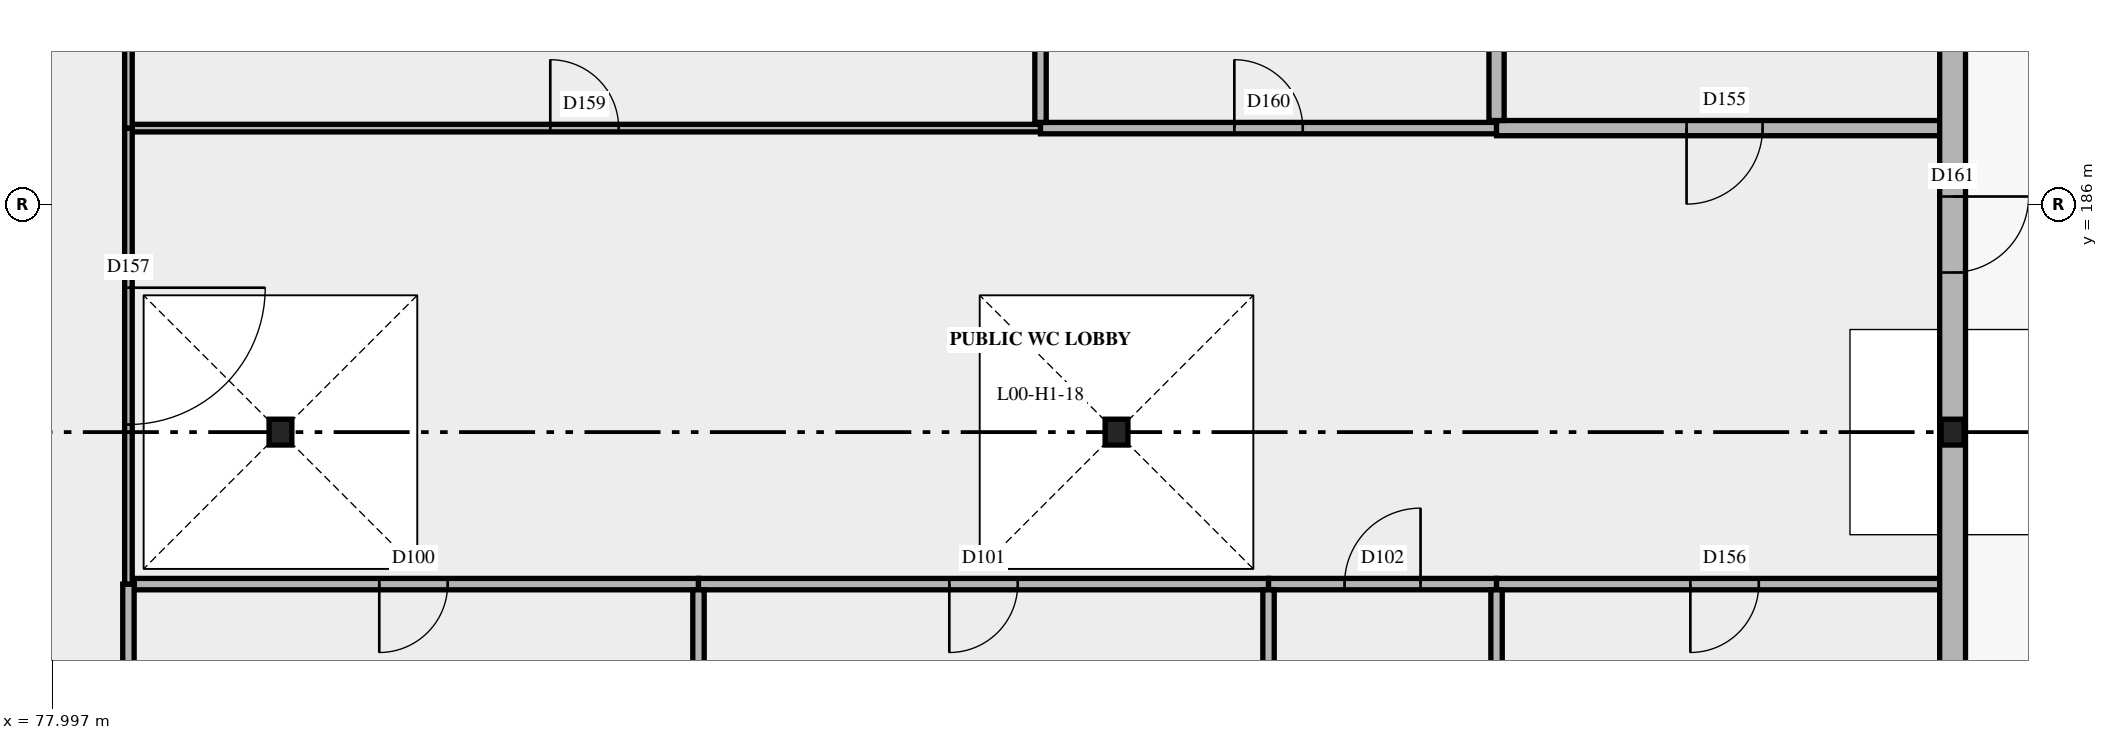
"""IFC4 building model, lengths in metres.
Left out: names, types, materials, properties, quantities, classifications, styles, units other than length and angle.
Written with IfcOpenShell. Run it as: python <this file> out.ifc"""

import sys

from ifc_helpers import new_model, si_unit, direction, frame, frame_2d, origin, origin_2d, place, context, subcontext, project, spatial, rectangle, i_section, extrude, element, fill, save


model = new_model("IFC4")
c1 = context("Model", 3, precision=1e-05, world=origin(), true_north=direction((0.0, 1.0)))
c2 = subcontext(c1, "Body", "Model", "MODEL_VIEW")
j1 = project(units=[si_unit("LENGTHUNIT", "METRE"), si_unit("PLANEANGLEUNIT", "RADIAN")], contexts=[c1])
p1 = place(None, origin())
s1 = spatial("IfcSite", under=j1, at=p1, CompositionType="ELEMENT")
p2 = place(p1, origin())
s2 = spatial("IfcBuilding", under=s1, at=p2, CompositionType="ELEMENT")
p3 = place(p2, origin())
s3 = spatial("IfcBuildingStorey", under=s2, at=p3, CompositionType="ELEMENT", Elevation=0.0)
for number, where, z_axis, x_axis in (
    (1, (81.0, 183.0, 0.0), (0.0, 0.0, 1.0), (1.0, 0.0, 0.0)),
    (2, (92.0, 183.0, 0.0), (0.0, 0.0, 1.0), (1.0, 0.0, 0.0)),
    (3, (103.0, 183.0, 0.0), (0.0, 0.0, 1.0), (1.0, 0.0, 0.0)),
):
    element("IfcColumn", number, at=place(p3, frame(where, z_axis=z_axis, x_axis=x_axis)), inside=s3, PredefinedType="COLUMN", context=c2, shape_type="SweptSolid", body=[
        extrude(i_section(OverallWidth=0.3, OverallDepth=0.34, WebThickness=0.012, FlangeThickness=0.021, at=origin_2d()), origin(), (0.0, 0.0, 1.0), 4.65),
    ])
p4 = place(p3, frame((79.075, 181.0, 0.0), z_axis=(0.0, 0.0, 1.0), x_axis=(1.0, 0.0, 0.0)))
e4 = element("IfcWall", 4, at=p4, inside=s3, PredefinedType="PARTITIONING", context=c2, shape_type="SweptSolid", body=[
    extrude(rectangle(XDim=7.425, YDim=0.15, at=frame_2d((3.712, 0.0))), origin(), (0.0, 0.0, 1.0), 5.15),
])
p5 = place(p4, frame((3.225, 0.0, 0.0)))
e5 = element("IfcOpeningElement", 5, at=p5, cuts=e4, PredefinedType="OPENING", context=c2, shape_type="SweptSolid", body=[
    extrude(rectangle(XDim=0.9, YDim=2.1, at=frame_2d((0.45, 1.05))), frame((0.0, 0.085, 0.0), z_axis=(0.0, -1.0, 0.0), x_axis=(1.0, 0.0, 0.0)), (0.0, 0.0, 1.0), 0.17),
])
p6 = place(p3, frame((86.5, 181.0, 0.0), z_axis=(0.0, 0.0, 1.0), x_axis=(1.0, 0.0, 0.0)))
e6 = element("IfcWall", 6, at=p6, inside=s3, PredefinedType="PARTITIONING", context=c2, shape_type="SweptSolid", body=[
    extrude(rectangle(XDim=7.5, YDim=0.15, at=frame_2d((3.75, 0.0))), origin(), (0.0, 0.0, 1.0), 5.15),
])
p7 = place(p6, frame((3.3, 0.0, 0.0)))
e7 = element("IfcOpeningElement", 7, at=p7, cuts=e6, PredefinedType="OPENING", context=c2, shape_type="SweptSolid", body=[
    extrude(rectangle(XDim=0.9, YDim=2.1, at=frame_2d((0.45, 1.05))), frame((0.0, 0.085, 0.0), z_axis=(0.0, -1.0, 0.0), x_axis=(1.0, 0.0, 0.0)), (0.0, 0.0, 1.0), 0.17),
])
p8 = place(p3, frame((94.0, 181.0, 0.0), z_axis=(0.0, 0.0, 1.0), x_axis=(1.0, 0.0, 0.0)))
e8 = element("IfcWall", 8, at=p8, inside=s3, PredefinedType="PARTITIONING", context=c2, shape_type="SweptSolid", body=[
    extrude(rectangle(XDim=3.0, YDim=0.15, at=frame_2d((1.5, 0.0))), origin(), (0.0, 0.0, 1.0), 5.15),
])
p9 = place(p8, frame((1.0, 0.0, 0.0)))
e9 = element("IfcOpeningElement", 9, at=p9, cuts=e8, PredefinedType="OPENING", context=c2, shape_type="SweptSolid", body=[
    extrude(rectangle(XDim=1.0, YDim=2.1, at=frame_2d((0.5, 1.05))), frame((0.0, 0.085, 0.0), z_axis=(0.0, -1.0, 0.0), x_axis=(1.0, 0.0, 0.0)), (0.0, 0.0, 1.0), 0.17),
])
p10 = place(p3, frame((97.0, 181.0, 0.0), z_axis=(0.0, 0.0, 1.0), x_axis=(1.0, 0.0, 0.0)))
e10 = element("IfcWall", 10, at=p10, inside=s3, PredefinedType="PARTITIONING", context=c2, shape_type="SweptSolid", body=[
    extrude(rectangle(XDim=6.0, YDim=0.15, at=frame_2d((3.0, 0.0))), origin(), (0.0, 0.0, 1.0), 5.15),
])
p11 = place(p10, frame((2.55, 0.0, 0.0)))
e11 = element("IfcOpeningElement", 11, at=p11, cuts=e10, PredefinedType="OPENING", context=c2, shape_type="SweptSolid", body=[
    extrude(rectangle(XDim=0.9, YDim=2.1, at=frame_2d((0.45, 1.05))), frame((0.0, 0.085, 0.0), z_axis=(0.0, -1.0, 0.0), x_axis=(1.0, 0.0, 0.0)), (0.0, 0.0, 1.0), 0.17),
])
p12 = place(p3, frame((79.05, 187.0, 0.0), z_axis=(0.0, 0.0, 1.0), x_axis=(1.0, 0.0, 0.0)))
e12 = element("IfcWall", 12, at=p12, inside=s3, PredefinedType="PARTITIONING", context=c2, shape_type="SweptSolid", body=[
    extrude(rectangle(XDim=11.95, YDim=0.1, at=frame_2d((5.975, 0.0))), origin(), (0.0, 0.0, 1.0), 5.15),
])
p13 = place(p12, frame((5.5, 0.0, 0.0)))
e13 = element("IfcOpeningElement", 13, at=p13, cuts=e12, PredefinedType="OPENING", context=c2, shape_type="SweptSolid", body=[
    extrude(rectangle(XDim=0.9, YDim=2.1, at=frame_2d((0.45, 1.05))), frame((0.0, 0.06, 0.0), z_axis=(0.0, -1.0, 0.0), x_axis=(1.0, 0.0, 0.0)), (0.0, 0.0, 1.0), 0.12),
])
p14 = place(p3, frame((91.0, 187.0, 0.0), z_axis=(0.0, 0.0, 1.0), x_axis=(1.0, 0.0, 0.0)))
e14 = element("IfcWall", 14, at=p14, inside=s3, PredefinedType="PARTITIONING", context=c2, shape_type="SweptSolid", body=[
    extrude(rectangle(XDim=6.0, YDim=0.15, at=frame_2d((3.0, 0.0))), origin(), (0.0, 0.0, 1.0), 5.15),
])
p15 = place(p14, frame((2.55, 0.0, 0.0)))
e15 = element("IfcOpeningElement", 15, at=p15, cuts=e14, PredefinedType="OPENING", context=c2, shape_type="SweptSolid", body=[
    extrude(rectangle(XDim=0.9, YDim=2.1, at=frame_2d((0.45, 1.05))), frame((0.0, 0.085, 0.0), z_axis=(0.0, -1.0, 0.0), x_axis=(1.0, 0.0, 0.0)), (0.0, 0.0, 1.0), 0.17),
])
p16 = place(p3, frame((97.0, 187.0, 0.0), z_axis=(0.0, 0.0, 1.0), x_axis=(1.0, 0.0, 0.0)))
e16 = element("IfcWall", 16, at=p16, inside=s3, PredefinedType="PARTITIONING", context=c2, shape_type="SweptSolid", body=[
    extrude(rectangle(XDim=6.0, YDim=0.2, at=frame_2d((3.0, 0.0))), origin(), (0.0, 0.0, 1.0), 5.15),
])
p17 = place(p16, frame((2.5, 0.0, 0.0)))
e17 = element("IfcOpeningElement", 17, at=p17, cuts=e16, PredefinedType="OPENING", context=c2, shape_type="SweptSolid", body=[
    extrude(rectangle(XDim=1.0, YDim=2.1, at=frame_2d((0.5, 1.05))), frame((0.0, 0.11, 0.0), z_axis=(0.0, -1.0, 0.0), x_axis=(1.0, 0.0, 0.0)), (0.0, 0.0, 1.0), 0.22),
])
p18 = place(p3, frame((79.0, 171.075, 0.0), z_axis=(0.0, 0.0, 1.0), x_axis=(0.0, 1.0, 0.0)))
e18 = element("IfcWall", 18, at=p18, inside=s3, PredefinedType="PARTITIONING", context=c2, shape_type="SweptSolid", body=[
    extrude(rectangle(XDim=9.925, YDim=0.15, at=frame_2d((4.962, 0.0))), origin(), (0.0, 0.0, 1.0), 5.15),
])
p19 = place(p3, frame((79.0, 181.0, 0.0), z_axis=(0.0, 0.0, 1.0), x_axis=(0.0, 1.0, 0.0)))
e19 = element("IfcWall", 19, at=p19, inside=s3, PredefinedType="PARTITIONING", context=c2, shape_type="SweptSolid", body=[
    extrude(rectangle(XDim=6.0, YDim=0.1, at=frame_2d((3.0, 0.0))), origin(), (0.0, 0.0, 1.0), 5.15),
])
p20 = place(p19, frame((2.1, 0.0, 0.0)))
e20 = element("IfcOpeningElement", 20, at=p20, cuts=e19, PredefinedType="OPENING", context=c2, shape_type="SweptSolid", body=[
    extrude(rectangle(XDim=1.8, YDim=2.1, at=frame_2d((0.9, 1.05))), frame((0.0, 0.06, 0.0), z_axis=(0.0, -1.0, 0.0), x_axis=(1.0, 0.0, 0.0)), (0.0, 0.0, 1.0), 0.12),
])
p21 = place(p3, frame((79.0, 187.0, 0.0), z_axis=(0.0, 0.0, 1.0), x_axis=(0.0, 1.0, 0.0)))
e21 = element("IfcWall", 21, at=p21, inside=s3, PredefinedType="PARTITIONING", context=c2, shape_type="SweptSolid", body=[
    extrude(rectangle(XDim=8.0, YDim=0.1, at=frame_2d((4.0, 0.0))), origin(), (0.0, 0.0, 1.0), 5.15),
])
p22 = place(p21, frame((3.55, 0.0, 0.0)))
e22 = element("IfcOpeningElement", 22, at=p22, cuts=e21, PredefinedType="OPENING", context=c2, shape_type="SweptSolid", body=[
    extrude(rectangle(XDim=0.9, YDim=2.1, at=frame_2d((0.45, 1.05))), frame((0.0, 0.06, 0.0), z_axis=(0.0, -1.0, 0.0), x_axis=(1.0, 0.0, 0.0)), (0.0, 0.0, 1.0), 0.12),
])
p23 = place(p3, frame((86.5, 171.075, 0.0), z_axis=(0.0, 0.0, 1.0), x_axis=(0.0, 1.0, 0.0)))
e23 = element("IfcWall", 23, at=p23, inside=s3, PredefinedType="PARTITIONING", context=c2, shape_type="SweptSolid", body=[
    extrude(rectangle(XDim=9.85, YDim=0.15, at=frame_2d((4.925, 0.0))), origin(), (0.0, 0.0, 1.0), 4.75),
])
p24 = place(p3, frame((91.0, 187.075, 0.0), z_axis=(0.0, 0.0, 1.0), x_axis=(0.0, 1.0, 0.0)))
e24 = element("IfcWall", 24, at=p24, inside=s3, PredefinedType="PARTITIONING", context=c2, shape_type="SweptSolid", body=[
    extrude(rectangle(XDim=7.925, YDim=0.15, at=frame_2d((3.962, 0.0))), origin(), (0.0, 0.0, 1.0), 5.15),
])
for number, where, z_axis, x_axis in (
    (25, (94.0, 171.075, 0.0), (0.0, 0.0, 1.0), (0.0, 1.0, 0.0)),
    (26, (97.0, 171.075, 0.0), (0.0, 0.0, 1.0), (0.0, 1.0, 0.0)),
):
    element("IfcWall", number, at=place(p3, frame(where, z_axis=z_axis, x_axis=x_axis)), inside=s3, PredefinedType="PARTITIONING", context=c2, shape_type="SweptSolid", body=[
        extrude(rectangle(XDim=9.85, YDim=0.15, at=frame_2d((4.925, 0.0))), origin(), (0.0, 0.0, 1.0), 5.15),
    ])
p25 = place(p3, frame((97.0, 187.1, 0.0), z_axis=(0.0, 0.0, 1.0), x_axis=(0.0, 1.0, 0.0)))
e27 = element("IfcWall", 27, at=p25, inside=s3, PredefinedType="PARTITIONING", context=c2, shape_type="SweptSolid", body=[
    extrude(rectangle(XDim=7.9, YDim=0.2, at=frame_2d((3.95, 0.0))), origin(), (0.0, 0.0, 1.0), 5.15),
])
p26 = place(p3, frame((103.0, 171.0, 0.0), z_axis=(0.0, 0.0, 1.0), x_axis=(0.0, 1.0, 0.0)))
e28 = element("IfcWall", 28, at=p26, inside=s3, PredefinedType="SOLIDWALL", context=c2, shape_type="SweptSolid", body=[
    extrude(rectangle(XDim=24.17, YDim=0.34, at=frame_2d((12.085, 0.0))), origin(), (0.0, 0.0, 1.0), 4.65),
])
p27 = place(p26, frame((15.1, 0.0, 0.0), z_axis=(0.0, 0.0, 1.0), x_axis=(-1.0, 0.0, 0.0)))
e29 = element("IfcOpeningElement", 29, at=p27, cuts=e28, PredefinedType="OPENING", context=c2, shape_type="SweptSolid", body=[
    extrude(rectangle(XDim=1.0, YDim=2.1, at=frame_2d((0.5, 1.05))), frame((0.0, 0.18, 0.0), z_axis=(0.0, -1.0, 0.0), x_axis=(1.0, 0.0, 0.0)), (0.0, 0.0, 1.0), 0.36),
])
p28 = place(p27, origin())
e30 = element("IfcDoor", 30, at=p28, inside=s3, OperationType="SINGLE_SWING_LEFT", PredefinedType="DOOR", context=c2, shape_type="SweptSolid", body=[
    extrude(rectangle(XDim=1.0, YDim=2.1, at=frame_2d((0.5, 1.05))), frame((0.0, 0.025, 0.0), z_axis=(0.0, -1.0, 0.0), x_axis=(1.0, 0.0, 0.0)), (0.0, 0.0, 1.0), 0.05),
])
fill(e29, e30)
p29 = place(p5, origin())
e31 = element("IfcDoor", 31, at=p29, inside=s3, OperationType="SINGLE_SWING_RIGHT", PredefinedType="DOOR", context=c2, shape_type="SweptSolid", body=[
    extrude(rectangle(XDim=0.9, YDim=2.1, at=frame_2d((0.45, 1.05))), frame((0.0, 0.025, 0.0), z_axis=(0.0, -1.0, 0.0), x_axis=(1.0, 0.0, 0.0)), (0.0, 0.0, 1.0), 0.05),
])
fill(e5, e31)
p30 = place(p7, origin())
e32 = element("IfcDoor", 32, at=p30, inside=s3, OperationType="SINGLE_SWING_RIGHT", PredefinedType="DOOR", context=c2, shape_type="SweptSolid", body=[
    extrude(rectangle(XDim=0.9, YDim=2.1, at=frame_2d((0.45, 1.05))), frame((0.0, 0.025, 0.0), z_axis=(0.0, -1.0, 0.0), x_axis=(1.0, 0.0, 0.0)), (0.0, 0.0, 1.0), 0.05),
])
fill(e7, e32)
p31 = place(p9, origin())
e33 = element("IfcDoor", 33, at=p31, inside=s3, OperationType="SINGLE_SWING_RIGHT", PredefinedType="DOOR", context=c2, shape_type="SweptSolid", body=[
    extrude(rectangle(XDim=1.0, YDim=2.1, at=frame_2d((0.5, 1.05))), frame((0.0, 0.025, 0.0), z_axis=(0.0, -1.0, 0.0), x_axis=(1.0, 0.0, 0.0)), (0.0, 0.0, 1.0), 0.05),
])
fill(e9, e33)
p32 = place(p17, origin())
e34 = element("IfcDoor", 34, at=p32, inside=s3, OperationType="SINGLE_SWING_RIGHT", PredefinedType="DOOR", context=c2, shape_type="SweptSolid", body=[
    extrude(rectangle(XDim=1.0, YDim=2.1, at=frame_2d((0.5, 1.05))), frame((0.0, 0.025, 0.0), z_axis=(0.0, -1.0, 0.0), x_axis=(1.0, 0.0, 0.0)), (0.0, 0.0, 1.0), 0.05),
])
fill(e17, e34)
p33 = place(p11, origin())
e35 = element("IfcDoor", 35, at=p33, inside=s3, OperationType="SINGLE_SWING_RIGHT", PredefinedType="DOOR", context=c2, shape_type="SweptSolid", body=[
    extrude(rectangle(XDim=0.9, YDim=2.1, at=frame_2d((0.45, 1.05))), frame((0.0, 0.025, 0.0), z_axis=(0.0, -1.0, 0.0), x_axis=(1.0, 0.0, 0.0)), (0.0, 0.0, 1.0), 0.05),
])
fill(e11, e35)
p34 = place(p20, origin())
e36 = element("IfcDoor", 36, at=p34, inside=s3, OperationType="DOUBLE_DOOR_SINGLE_SWING", PredefinedType="DOOR", context=c2, shape_type="SweptSolid", body=[
    extrude(rectangle(XDim=1.8, YDim=2.1, at=frame_2d((0.9, 1.05))), frame((0.0, 0.025, 0.0), z_axis=(0.0, -1.0, 0.0), x_axis=(1.0, 0.0, 0.0)), (0.0, 0.0, 1.0), 0.05),
])
fill(e20, e36)
p35 = place(p13, origin())
e37 = element("IfcDoor", 37, at=p35, inside=s3, OperationType="SINGLE_SWING_LEFT", PredefinedType="DOOR", context=c2, shape_type="SweptSolid", body=[
    extrude(rectangle(XDim=0.9, YDim=2.1, at=frame_2d((0.45, 1.05))), frame((0.0, 0.025, 0.0), z_axis=(0.0, -1.0, 0.0), x_axis=(1.0, 0.0, 0.0)), (0.0, 0.0, 1.0), 0.05),
])
fill(e13, e37)
p36 = place(p15, origin())
e38 = element("IfcDoor", 38, at=p36, inside=s3, OperationType="SINGLE_SWING_LEFT", PredefinedType="DOOR", context=c2, shape_type="SweptSolid", body=[
    extrude(rectangle(XDim=0.9, YDim=2.1, at=frame_2d((0.45, 1.05))), frame((0.0, 0.025, 0.0), z_axis=(0.0, -1.0, 0.0), x_axis=(1.0, 0.0, 0.0)), (0.0, 0.0, 1.0), 0.05),
])
fill(e15, e38)
save(model, sys.argv[1])
